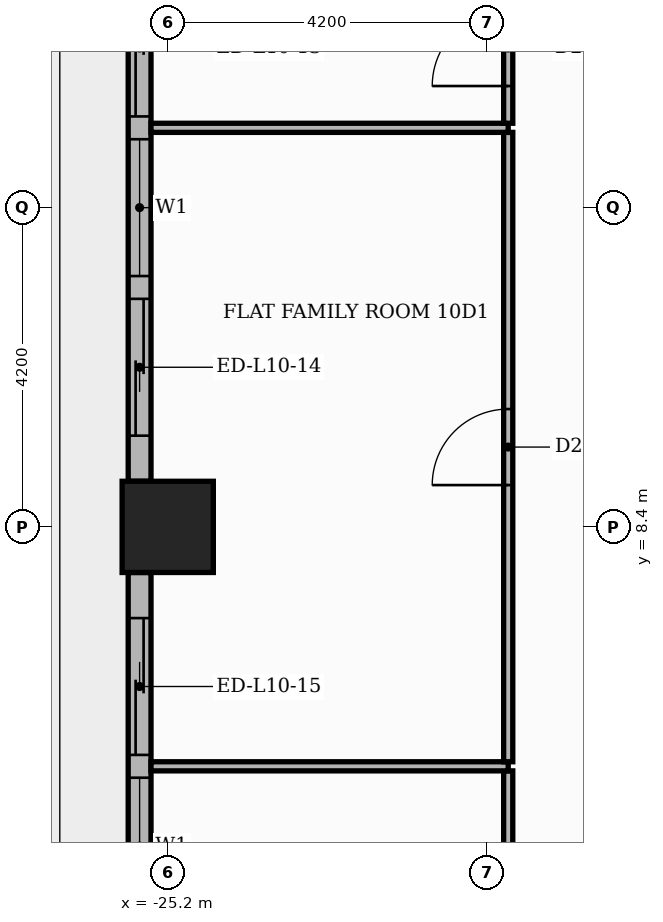
"""IFC4 building model, lengths in metres.
Left out: names, types, materials, properties, quantities, classifications, styles, units other than length and angle.
Written with IfcOpenShell. Run it as: python <this file> out.ifc"""

import sys

from ifc_helpers import new_model, si_unit, direction, frame, frame_2d, origin, origin_2d, place, context, subcontext, project, spatial, rectangle, extrude, element, fill, save


model = new_model("IFC4")
c1 = context("Model", 3, precision=1e-05, world=origin(), true_north=direction((0.0, 1.0)))
c2 = subcontext(c1, "Body", "Model", "MODEL_VIEW")
j1 = project(units=[si_unit("LENGTHUNIT", "METRE"), si_unit("PLANEANGLEUNIT", "RADIAN")], contexts=[c1])
p1 = place(None, origin())
s1 = spatial("IfcSite", under=j1, at=p1, CompositionType="ELEMENT")
p2 = place(p1, origin())
s2 = spatial("IfcBuilding", under=s1, at=p2, CompositionType="ELEMENT")
p3 = place(p2, frame((0.0, 0.0, 46.5)))
s3 = spatial("IfcBuildingStorey", under=s2, at=p3, CompositionType="ELEMENT", Elevation=46.5)
p4 = place(p3, frame((-25.2, 8.4, 0.0), z_axis=(0.0, 0.0, 1.0), x_axis=(1.0, 0.0, 0.0)))
e1 = element("IfcColumn", 1, at=p4, inside=s3, PredefinedType="COLUMN", context=c2, shape_type="SweptSolid", body=[
    extrude(rectangle(XDim=1.2, YDim=1.2, at=origin_2d()), origin(), (0.0, 0.0, 1.0), 3.9),
])
p5 = place(p3, frame((-25.57, 16.2, 0.0), z_axis=(0.0, 0.0, 1.0), x_axis=(0.0, -1.0, 0.0)))
e2 = element("IfcWall", 2, at=p5, inside=s3, PredefinedType="STANDARD", context=c2, shape_type="SweptSolid", body=[
    extrude(rectangle(XDim=7.2, YDim=0.3, at=frame_2d((3.6, 0.0))), origin(), (0.0, 0.0, 1.0), 3.48),
])
p6 = place(p5, frame((0.6, 0.0, 0.0)))
e3 = element("IfcOpeningElement", 3, at=p6, cuts=e2, PredefinedType="OPENING", context=c2, shape_type="SweptSolid", body=[
    extrude(rectangle(XDim=1.8, YDim=2.4, at=frame_2d((0.9, 1.2))), frame((0.0, 0.16, 0.0), z_axis=(0.0, -1.0, 0.0), x_axis=(1.0, 0.0, 0.0)), (0.0, 0.0, 1.0), 0.32),
])
p7 = place(p5, frame((2.7, 0.0, 0.9)))
e4 = element("IfcOpeningElement", 4, at=p7, cuts=e2, PredefinedType="OPENING", context=c2, shape_type="SweptSolid", body=[
    extrude(rectangle(XDim=1.8, YDim=2.1, at=frame_2d((0.9, 1.05))), frame((0.0, 0.16, 0.0), z_axis=(0.0, -1.0, 0.0), x_axis=(1.0, 0.0, 0.0)), (0.0, 0.0, 1.0), 0.32),
])
p8 = place(p5, frame((4.8, 0.0, 0.0)))
e5 = element("IfcOpeningElement", 5, at=p8, cuts=e2, PredefinedType="OPENING", context=c2, shape_type="SweptSolid", body=[
    extrude(rectangle(XDim=1.8, YDim=2.4, at=frame_2d((0.9, 1.2))), frame((0.0, 0.16, 0.0), z_axis=(0.0, -1.0, 0.0), x_axis=(1.0, 0.0, 0.0)), (0.0, 0.0, 1.0), 0.32),
])
p9 = place(p3, frame((-25.57, 7.8, 0.0), z_axis=(0.0, 0.0, 1.0), x_axis=(0.0, -1.0, 0.0)))
e6 = element("IfcWall", 6, at=p9, inside=s3, PredefinedType="STANDARD", context=c2, shape_type="SweptSolid", body=[
    extrude(rectangle(XDim=7.2, YDim=0.3, at=frame_2d((3.6, 0.0))), origin(), (0.0, 0.0, 1.0), 3.48),
])
p10 = place(p9, frame((0.6, 0.0, 0.0)))
e7 = element("IfcOpeningElement", 7, at=p10, cuts=e6, PredefinedType="OPENING", context=c2, shape_type="SweptSolid", body=[
    extrude(rectangle(XDim=1.8, YDim=2.4, at=frame_2d((0.9, 1.2))), frame((0.0, 0.16, 0.0), z_axis=(0.0, -1.0, 0.0), x_axis=(1.0, 0.0, 0.0)), (0.0, 0.0, 1.0), 0.32),
])
p11 = place(p9, frame((2.7, 0.0, 0.9)))
e8 = element("IfcOpeningElement", 8, at=p11, cuts=e6, PredefinedType="OPENING", context=c2, shape_type="SweptSolid", body=[
    extrude(rectangle(XDim=1.8, YDim=2.1, at=frame_2d((0.9, 1.05))), frame((0.0, 0.16, 0.0), z_axis=(0.0, -1.0, 0.0), x_axis=(1.0, 0.0, 0.0)), (0.0, 0.0, 1.0), 0.32),
])
p12 = place(p9, frame((4.8, 0.0, 0.0)))
e9 = element("IfcOpeningElement", 9, at=p12, cuts=e6, PredefinedType="OPENING", context=c2, shape_type="SweptSolid", body=[
    extrude(rectangle(XDim=1.8, YDim=2.4, at=frame_2d((0.9, 1.2))), frame((0.0, 0.16, 0.0), z_axis=(0.0, -1.0, 0.0), x_axis=(1.0, 0.0, 0.0)), (0.0, 0.0, 1.0), 0.32),
])
p13 = place(p3, frame((-20.72, -3.09, 0.0), z_axis=(0.0, 0.0, 1.0), x_axis=(0.0, 1.0, 0.0)))
e10 = element("IfcWall", 10, at=p13, inside=s3, PredefinedType="PARTITIONING", context=c2, shape_type="SweptSolid", body=[
    extrude(rectangle(XDim=8.28, YDim=0.12, at=frame_2d((4.14, 0.0))), origin(), (0.0, 0.0, 1.0), 3.48),
])
p14 = place(p13, frame((3.69, 0.0, 0.0)))
e11 = element("IfcOpeningElement", 11, at=p14, cuts=e10, PredefinedType="OPENING", context=c2, shape_type="SweptSolid", body=[
    extrude(rectangle(XDim=0.9, YDim=2.1, at=frame_2d((0.45, 1.05))), frame((0.0, 0.07, 0.0), z_axis=(0.0, -1.0, 0.0), x_axis=(1.0, 0.0, 0.0)), (0.0, 0.0, 1.0), 0.14),
])
p15 = place(p3, frame((-25.42, 5.25, 0.0), z_axis=(0.0, 0.0, 1.0), x_axis=(1.0, 0.0, 0.0)))
e12 = element("IfcWall", 12, at=p15, inside=s3, PredefinedType="PARTITIONING", context=c2, shape_type="SweptSolid", body=[
    extrude(rectangle(XDim=4.7, YDim=0.12, at=frame_2d((2.35, 0.0))), origin(), (0.0, 0.0, 1.0), 3.48),
])
p16 = place(p3, frame((-20.72, 5.31, 0.0), z_axis=(0.0, 0.0, 1.0), x_axis=(0.0, 1.0, 0.0)))
e13 = element("IfcWall", 13, at=p16, inside=s3, PredefinedType="PARTITIONING", context=c2, shape_type="SweptSolid", body=[
    extrude(rectangle(XDim=8.28, YDim=0.12, at=frame_2d((4.14, 0.0))), origin(), (0.0, 0.0, 1.0), 3.48),
])
p17 = place(p16, frame((3.64, 0.0, 0.0)))
e14 = element("IfcOpeningElement", 14, at=p17, cuts=e13, PredefinedType="OPENING", context=c2, shape_type="SweptSolid", body=[
    extrude(rectangle(XDim=1.0, YDim=2.1, at=frame_2d((0.5, 1.05))), frame((0.0, 0.07, 0.0), z_axis=(0.0, -1.0, 0.0), x_axis=(1.0, 0.0, 0.0)), (0.0, 0.0, 1.0), 0.14),
])
p18 = place(p3, frame((-25.42, 13.65, 0.0), z_axis=(0.0, 0.0, 1.0), x_axis=(1.0, 0.0, 0.0)))
e15 = element("IfcWall", 15, at=p18, inside=s3, PredefinedType="PARTITIONING", context=c2, shape_type="SweptSolid", body=[
    extrude(rectangle(XDim=4.7, YDim=0.12, at=frame_2d((2.35, 0.0))), origin(), (0.0, 0.0, 1.0), 3.48),
])
p19 = place(p3, frame((-20.72, 13.71, 0.0), z_axis=(0.0, 0.0, 1.0), x_axis=(0.0, 1.0, 0.0)))
e16 = element("IfcWall", 16, at=p19, inside=s3, PredefinedType="PARTITIONING", context=c2, shape_type="SweptSolid", body=[
    extrude(rectangle(XDim=1.98, YDim=0.12, at=frame_2d((0.99, 0.0))), origin(), (0.0, 0.0, 1.0), 3.48),
])
p20 = place(p19, frame((0.49, 0.0, 0.0)))
e17 = element("IfcOpeningElement", 17, at=p20, cuts=e16, PredefinedType="OPENING", context=c2, shape_type="SweptSolid", body=[
    extrude(rectangle(XDim=1.0, YDim=2.1, at=frame_2d((0.5, 1.05))), frame((0.0, 0.07, 0.0), z_axis=(0.0, -1.0, 0.0), x_axis=(1.0, 0.0, 0.0)), (0.0, 0.0, 1.0), 0.14),
])
p21 = place(p6, origin())
e18 = element("IfcDoor", 18, at=p21, inside=s3, OperationType="SLIDING_TO_LEFT", PredefinedType="DOOR", context=c2, shape_type="SweptSolid", body=[
    extrude(rectangle(XDim=1.8, YDim=2.4, at=frame_2d((0.9, 1.2))), frame((0.0, 0.025, 0.0), z_axis=(0.0, -1.0, 0.0), x_axis=(1.0, 0.0, 0.0)), (0.0, 0.0, 1.0), 0.05),
])
fill(e3, e18)
p22 = place(p7, origin())
e19 = element("IfcWindow", 19, at=p22, inside=s3, PartitioningType="SINGLE_PANEL", PredefinedType="WINDOW", context=c2, shape_type="SweptSolid", body=[
    extrude(rectangle(XDim=1.8, YDim=2.1, at=frame_2d((0.9, 1.05))), frame((0.0, 0.03, 0.0), z_axis=(0.0, -1.0, 0.0), x_axis=(1.0, 0.0, 0.0)), (0.0, 0.0, 1.0), 0.06),
])
fill(e4, e19)
p23 = place(p8, origin())
e20 = element("IfcDoor", 20, at=p23, inside=s3, OperationType="SLIDING_TO_RIGHT", PredefinedType="DOOR", context=c2, shape_type="SweptSolid", body=[
    extrude(rectangle(XDim=1.8, YDim=2.4, at=frame_2d((0.9, 1.2))), frame((0.0, 0.025, 0.0), z_axis=(0.0, -1.0, 0.0), x_axis=(1.0, 0.0, 0.0)), (0.0, 0.0, 1.0), 0.05),
])
fill(e5, e20)
p24 = place(p10, origin())
e21 = element("IfcDoor", 21, at=p24, inside=s3, OperationType="SLIDING_TO_LEFT", PredefinedType="DOOR", context=c2, shape_type="SweptSolid", body=[
    extrude(rectangle(XDim=1.8, YDim=2.4, at=frame_2d((0.9, 1.2))), frame((0.0, 0.025, 0.0), z_axis=(0.0, -1.0, 0.0), x_axis=(1.0, 0.0, 0.0)), (0.0, 0.0, 1.0), 0.05),
])
fill(e7, e21)
p25 = place(p11, origin())
e22 = element("IfcWindow", 22, at=p25, inside=s3, PartitioningType="SINGLE_PANEL", PredefinedType="WINDOW", context=c2, shape_type="SweptSolid", body=[
    extrude(rectangle(XDim=1.8, YDim=2.1, at=frame_2d((0.9, 1.05))), frame((0.0, 0.03, 0.0), z_axis=(0.0, -1.0, 0.0), x_axis=(1.0, 0.0, 0.0)), (0.0, 0.0, 1.0), 0.06),
])
fill(e8, e22)
p26 = place(p20, origin())
e23 = element("IfcDoor", 23, at=p26, inside=s3, OperationType="SINGLE_SWING_LEFT", PredefinedType="DOOR", context=c2, shape_type="SweptSolid", body=[
    extrude(rectangle(XDim=1.0, YDim=2.1, at=frame_2d((0.5, 1.05))), frame((0.0, 0.025, 0.0), z_axis=(0.0, -1.0, 0.0), x_axis=(1.0, 0.0, 0.0)), (0.0, 0.0, 1.0), 0.05),
])
fill(e17, e23)
p27 = place(p17, origin())
e24 = element("IfcDoor", 24, at=p27, inside=s3, OperationType="SINGLE_SWING_LEFT", PredefinedType="DOOR", context=c2, shape_type="SweptSolid", body=[
    extrude(rectangle(XDim=1.0, YDim=2.1, at=frame_2d((0.5, 1.05))), frame((0.0, 0.025, 0.0), z_axis=(0.0, -1.0, 0.0), x_axis=(1.0, 0.0, 0.0)), (0.0, 0.0, 1.0), 0.05),
])
fill(e14, e24)
save(model, sys.argv[1])
